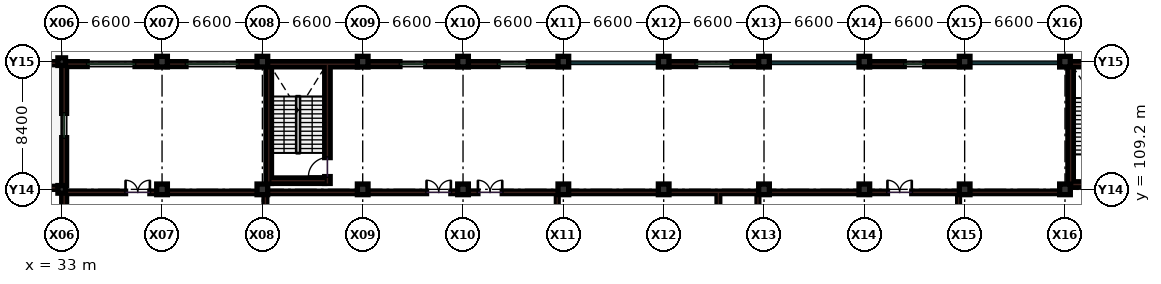
"""IFC4 building model, lengths in metres.
Left out: names, types, materials, properties, quantities, classifications, styles, units other than length and angle.
Written with IfcOpenShell. Run it as: python <this file> out.ifc"""

import sys

from ifc_helpers import new_model, si_unit, direction, frame, frame_2d, origin, origin_2d, place, context, subcontext, project, spatial, rectangle, extrude, element, fill, save


model = new_model("IFC4")
c1 = context("Model", 3, precision=1e-05, world=origin(), true_north=direction((0.0, 1.0)))
c2 = subcontext(c1, "Body", "Model", "MODEL_VIEW")
j1 = project(units=[si_unit("LENGTHUNIT", "METRE"), si_unit("PLANEANGLEUNIT", "RADIAN")], contexts=[c1])
p1 = place(None, origin())
s1 = spatial("IfcSite", under=j1, at=p1, CompositionType="ELEMENT")
p2 = place(p1, origin())
s2 = spatial("IfcBuilding", under=s1, at=p2, CompositionType="ELEMENT")
p3 = place(p2, frame((0.0, 0.0, 5.4)))
s3 = spatial("IfcBuildingStorey", under=s2, at=p3, CompositionType="ELEMENT", Elevation=5.4)
for number, where, z_axis, x_axis in (
    (1, (33.0, 109.2, 0.0), (0.0, 0.0, 1.0), (1.0, 0.0, 0.0)),
    (2, (33.0, 117.6, 0.0), (0.0, 0.0, 1.0), (1.0, 0.0, 0.0)),
):
    element("IfcColumn", number, at=place(p3, frame(where, z_axis=z_axis, x_axis=x_axis)), inside=s3, PredefinedType="COLUMN", context=c2, shape_type="SweptSolid", body=[
        extrude(rectangle(XDim=0.5, YDim=0.5, at=origin_2d()), origin(), (0.0, 0.0, 1.0), 4.5),
    ])
for number, where, z_axis, x_axis in (
    (3, (39.6, 109.2, 0.0), (0.0, 0.0, 1.0), (1.0, 0.0, 0.0)),
    (4, (39.6, 117.6, 0.0), (0.0, 0.0, 1.0), (1.0, 0.0, 0.0)),
    (5, (46.2, 109.2, 0.0), (0.0, 0.0, 1.0), (1.0, 0.0, 0.0)),
    (6, (46.2, 117.6, 0.0), (0.0, 0.0, 1.0), (1.0, 0.0, 0.0)),
    (7, (52.8, 109.2, 0.0), (0.0, 0.0, 1.0), (1.0, 0.0, 0.0)),
    (8, (52.8, 117.6, 0.0), (0.0, 0.0, 1.0), (1.0, 0.0, 0.0)),
    (9, (59.4, 109.2, 0.0), (0.0, 0.0, 1.0), (1.0, 0.0, 0.0)),
    (10, (59.4, 117.6, 0.0), (0.0, 0.0, 1.0), (1.0, 0.0, 0.0)),
    (11, (66.0, 109.2, 0.0), (0.0, 0.0, 1.0), (1.0, 0.0, 0.0)),
    (12, (66.0, 117.6, 0.0), (0.0, 0.0, 1.0), (1.0, 0.0, 0.0)),
    (13, (72.6, 109.2, 0.0), (0.0, 0.0, 1.0), (1.0, 0.0, 0.0)),
    (14, (72.6, 117.6, 0.0), (0.0, 0.0, 1.0), (1.0, 0.0, 0.0)),
    (15, (79.2, 109.2, 0.0), (0.0, 0.0, 1.0), (1.0, 0.0, 0.0)),
    (16, (79.2, 117.6, 0.0), (0.0, 0.0, 1.0), (1.0, 0.0, 0.0)),
    (17, (85.8, 109.2, 0.0), (0.0, 0.0, 1.0), (1.0, 0.0, 0.0)),
    (18, (85.8, 117.6, 0.0), (0.0, 0.0, 1.0), (1.0, 0.0, 0.0)),
    (19, (92.4, 109.2, 0.0), (0.0, 0.0, 1.0), (1.0, 0.0, 0.0)),
    (20, (92.4, 117.6, 0.0), (0.0, 0.0, 1.0), (1.0, 0.0, 0.0)),
    (21, (99.0, 109.2, 0.0), (0.0, 0.0, 1.0), (1.0, 0.0, 0.0)),
    (22, (99.0, 117.6, 0.0), (0.0, 0.0, 1.0), (1.0, 0.0, 0.0)),
):
    element("IfcColumn", number, at=place(p3, frame(where, z_axis=z_axis, x_axis=x_axis)), inside=s3, PredefinedType="COLUMN", context=c2, shape_type="SweptSolid", body=[
        extrude(rectangle(XDim=0.7, YDim=0.7, at=origin_2d()), origin(), (0.0, 0.0, 1.0), 4.5),
    ])
p4 = place(p3, frame((33.32, 109.0, 0.0), z_axis=(0.0, 0.0, 1.0), x_axis=(1.0, 0.0, 0.0)))
e23 = element("IfcWall", 23, at=p4, inside=s3, PredefinedType="PARTITIONING", context=c2, shape_type="SweptSolid", body=[
    extrude(rectangle(XDim=5.83, YDim=0.16, at=frame_2d((2.915, 0.0))), origin(), (0.0, 0.0, 1.0), 3.435),
])
p5 = place(p4, frame((3.88, 0.0, 0.0)))
e24 = element("IfcOpeningElement", 24, at=p5, cuts=e23, PredefinedType="OPENING", context=c2, shape_type="SweptSolid", body=[
    extrude(rectangle(XDim=1.6, YDim=2.2, at=frame_2d((0.8, 1.1))), frame((0.0, 0.09, 0.0), z_axis=(0.0, -1.0, 0.0), x_axis=(1.0, 0.0, 0.0)), (0.0, 0.0, 1.0), 0.18),
])
p6 = place(p3, frame((40.05, 109.0, 0.0), z_axis=(0.0, 0.0, 1.0), x_axis=(1.0, 0.0, 0.0)))
e25 = element("IfcWall", 25, at=p6, inside=s3, PredefinedType="PARTITIONING", context=c2, shape_type="SweptSolid", body=[
    extrude(rectangle(XDim=5.7, YDim=0.16, at=frame_2d((2.85, 0.0))), origin(), (0.0, 0.0, 1.0), 3.435),
])
p7 = place(p3, frame((46.65, 109.0, 0.0), z_axis=(0.0, 0.0, 1.0), x_axis=(1.0, 0.0, 0.0)))
e26 = element("IfcWall", 26, at=p7, inside=s3, PredefinedType="PARTITIONING", context=c2, shape_type="SweptSolid", body=[
    extrude(rectangle(XDim=5.7, YDim=0.16, at=frame_2d((2.85, 0.0))), origin(), (0.0, 0.0, 1.0), 3.435),
])
p8 = place(p3, frame((53.25, 109.0, 0.0), z_axis=(0.0, 0.0, 1.0), x_axis=(1.0, 0.0, 0.0)))
e27 = element("IfcWall", 27, at=p8, inside=s3, PredefinedType="PARTITIONING", context=c2, shape_type="SweptSolid", body=[
    extrude(rectangle(XDim=5.7, YDim=0.16, at=frame_2d((2.85, 0.0))), origin(), (0.0, 0.0, 1.0), 3.435),
])
p9 = place(p8, frame((3.75, 0.0, 0.0)))
e28 = element("IfcOpeningElement", 28, at=p9, cuts=e27, PredefinedType="OPENING", context=c2, shape_type="SweptSolid", body=[
    extrude(rectangle(XDim=1.6, YDim=2.2, at=frame_2d((0.8, 1.1))), frame((0.0, 0.09, 0.0), z_axis=(0.0, -1.0, 0.0), x_axis=(1.0, 0.0, 0.0)), (0.0, 0.0, 1.0), 0.18),
])
p10 = place(p3, frame((59.85, 109.0, 0.0), z_axis=(0.0, 0.0, 1.0), x_axis=(1.0, 0.0, 0.0)))
e29 = element("IfcWall", 29, at=p10, inside=s3, PredefinedType="PARTITIONING", context=c2, shape_type="SweptSolid", body=[
    extrude(rectangle(XDim=5.7, YDim=0.16, at=frame_2d((2.85, 0.0))), origin(), (0.0, 0.0, 1.0), 3.435),
])
p11 = place(p10, frame((0.53, 0.0, 0.0)))
e30 = element("IfcOpeningElement", 30, at=p11, cuts=e29, PredefinedType="OPENING", context=c2, shape_type="SweptSolid", body=[
    extrude(rectangle(XDim=1.6, YDim=2.2, at=frame_2d((0.8, 1.1))), frame((0.0, 0.09, 0.0), z_axis=(0.0, -1.0, 0.0), x_axis=(1.0, 0.0, 0.0)), (0.0, 0.0, 1.0), 0.18),
])
for number, where, z_axis, x_axis in (
    (31, (66.45, 109.0, 0.0), (0.0, 0.0, 1.0), (1.0, 0.0, 0.0)),
    (32, (73.05, 109.0, 0.0), (0.0, 0.0, 1.0), (1.0, 0.0, 0.0)),
):
    element("IfcWall", number, at=place(p3, frame(where, z_axis=z_axis, x_axis=x_axis)), inside=s3, PredefinedType="PARTITIONING", context=c2, shape_type="SweptSolid", body=[
        extrude(rectangle(XDim=5.7, YDim=0.16, at=frame_2d((2.85, 0.0))), origin(), (0.0, 0.0, 1.0), 3.435),
    ])
p12 = place(p3, frame((79.65, 109.0, 0.0), z_axis=(0.0, 0.0, 1.0), x_axis=(1.0, 0.0, 0.0)))
e33 = element("IfcWall", 33, at=p12, inside=s3, PredefinedType="PARTITIONING", context=c2, shape_type="SweptSolid", body=[
    extrude(rectangle(XDim=5.7, YDim=0.16, at=frame_2d((2.85, 0.0))), origin(), (0.0, 0.0, 1.0), 3.435),
])
p13 = place(p3, frame((86.25, 109.0, 0.0), z_axis=(0.0, 0.0, 1.0), x_axis=(1.0, 0.0, 0.0)))
e34 = element("IfcWall", 34, at=p13, inside=s3, PredefinedType="PARTITIONING", context=c2, shape_type="SweptSolid", body=[
    extrude(rectangle(XDim=5.7, YDim=0.16, at=frame_2d((2.85, 0.0))), origin(), (0.0, 0.0, 1.0), 3.435),
])
p14 = place(p13, frame((1.07, 0.0, 0.0)))
e35 = element("IfcOpeningElement", 35, at=p14, cuts=e34, PredefinedType="OPENING", context=c2, shape_type="SweptSolid", body=[
    extrude(rectangle(XDim=1.6, YDim=2.2, at=frame_2d((0.8, 1.1))), frame((0.0, 0.09, 0.0), z_axis=(0.0, -1.0, 0.0), x_axis=(1.0, 0.0, 0.0)), (0.0, 0.0, 1.0), 0.18),
])
p15 = place(p3, frame((92.85, 109.0, 0.0), z_axis=(0.0, 0.0, 1.0), x_axis=(1.0, 0.0, 0.0)))
e36 = element("IfcWall", 36, at=p15, inside=s3, PredefinedType="PARTITIONING", context=c2, shape_type="SweptSolid", body=[
    extrude(rectangle(XDim=6.45, YDim=0.16, at=frame_2d((3.225, 0.0))), origin(), (0.0, 0.0, 1.0), 3.435),
])
for number, where, z_axis, x_axis in (
    (37, (46.4, 100.8, 0.0), (0.0, 0.0, 1.0), (0.0, 1.0, 0.0)),
    (38, (76.2, 100.8, 0.0), (0.0, 0.0, 1.0), (0.0, 1.0, 0.0)),
):
    element("IfcWall", number, at=place(p3, frame(where, z_axis=z_axis, x_axis=x_axis)), inside=s3, PredefinedType="SOLIDWALL", context=c2, shape_type="SweptSolid", body=[
        extrude(rectangle(XDim=8.2, YDim=0.18, at=frame_2d((4.1, 0.0))), origin(), (0.0, 0.0, 1.0), 3.45),
    ])
p16 = place(p3, frame((65.6, 101.0, 0.0), z_axis=(0.0, 0.0, 1.0), x_axis=(0.0, 1.0, 0.0)))
e39 = element("IfcWall", 39, at=p16, inside=s3, PredefinedType="PARTITIONING", context=c2, shape_type="SweptSolid", body=[
    extrude(rectangle(XDim=8.0, YDim=0.12, at=frame_2d((4.0, 0.0))), origin(), (0.0, 0.0, 1.0), 3.45),
])
p17 = place(p16, frame((3.8, 0.0, 0.0)))
e40 = element("IfcOpeningElement", 40, at=p17, cuts=e39, PredefinedType="OPENING", context=c2, shape_type="SweptSolid", body=[
    extrude(rectangle(XDim=1.15, YDim=2.2, at=frame_2d((0.575, 1.1))), frame((0.0, 0.07, 0.0), z_axis=(0.0, -1.0, 0.0), x_axis=(1.0, 0.0, 0.0)), (0.0, 0.0, 1.0), 0.14),
])
p18 = place(p3, frame((78.8, 101.0, 0.0), z_axis=(0.0, 0.0, 1.0), x_axis=(0.0, 1.0, 0.0)))
e41 = element("IfcWall", 41, at=p18, inside=s3, PredefinedType="PARTITIONING", context=c2, shape_type="SweptSolid", body=[
    extrude(rectangle(XDim=8.0, YDim=0.12, at=frame_2d((4.0, 0.0))), origin(), (0.0, 0.0, 1.0), 3.45),
])
p19 = place(p18, frame((3.8, 0.0, 0.0)))
e42 = element("IfcOpeningElement", 42, at=p19, cuts=e41, PredefinedType="OPENING", context=c2, shape_type="SweptSolid", body=[
    extrude(rectangle(XDim=1.45, YDim=2.25, at=frame_2d((0.725, 1.125))), frame((0.0, 0.07, 0.0), z_axis=(0.0, -1.0, 0.0), x_axis=(1.0, 0.0, 0.0)), (0.0, 0.0, 1.0), 0.14),
])
p20 = place(p3, frame((92.0, 101.0, 0.0), z_axis=(0.0, 0.0, 1.0), x_axis=(0.0, 1.0, 0.0)))
e43 = element("IfcWall", 43, at=p20, inside=s3, PredefinedType="PARTITIONING", context=c2, shape_type="SweptSolid", body=[
    extrude(rectangle(XDim=8.0, YDim=0.12, at=frame_2d((4.0, 0.0))), origin(), (0.0, 0.0, 1.0), 3.45),
])
p21 = place(p20, frame((3.8, 0.0, 0.0)))
e44 = element("IfcOpeningElement", 44, at=p21, cuts=e43, PredefinedType="OPENING", context=c2, shape_type="SweptSolid", body=[
    extrude(rectangle(XDim=1.75, YDim=2.3, at=frame_2d((0.875, 1.15))), frame((0.0, 0.07, 0.0), z_axis=(0.0, -1.0, 0.0), x_axis=(1.0, 0.0, 0.0)), (0.0, 0.0, 1.0), 0.14),
])
p22 = place(p3, frame((33.16, 108.955, 0.0), z_axis=(0.0, 0.0, 1.0), x_axis=(0.0, -1.0, 0.0)))
e45 = element("IfcWall", 45, at=p22, inside=s3, PredefinedType="SOLIDWALL", context=c2, shape_type="SweptSolid", body=[
    extrude(rectangle(XDim=7.91, YDim=0.32, at=frame_2d((3.955, 0.0))), origin(), (0.0, 0.0, 1.0), 3.485),
])
p23 = place(p22, frame((3.305, 0.0, 0.95)))
e46 = element("IfcOpeningElement", 46, at=p23, cuts=e45, PredefinedType="OPENING", context=c2, shape_type="SweptSolid", body=[
    extrude(rectangle(XDim=1.3, YDim=1.75, at=frame_2d((0.65, 0.875))), frame((0.0, 0.17, 0.0), z_axis=(0.0, -1.0, 0.0), x_axis=(1.0, 0.0, 0.0)), (0.0, 0.0, 1.0), 0.34),
])
p24 = place(p3, frame((39.255, 117.44, 0.0), z_axis=(0.0, 0.0, 1.0), x_axis=(-1.0, 0.0, 0.0)))
e47 = element("IfcWall", 47, at=p24, inside=s3, PredefinedType="SOLIDWALL", context=c2, shape_type="SweptSolid", body=[
    extrude(rectangle(XDim=6.01, YDim=0.32, at=frame_2d((3.005, 0.0))), origin(), (0.0, 0.0, 1.0), 3.585),
])
p25 = place(p24, frame((1.43, 0.0, 0.95)))
e48 = element("IfcOpeningElement", 48, at=p25, cuts=e47, PredefinedType="OPENING", context=c2, shape_type="SweptSolid", body=[
    extrude(rectangle(XDim=3.15, YDim=1.7, at=frame_2d((1.575, 0.85))), frame((0.0, 0.17, 0.0), z_axis=(0.0, -1.0, 0.0), x_axis=(1.0, 0.0, 0.0)), (0.0, 0.0, 1.0), 0.34),
])
p26 = place(p3, frame((33.16, 117.355, 0.0), z_axis=(0.0, 0.0, 1.0), x_axis=(0.0, -1.0, 0.0)))
e49 = element("IfcWall", 49, at=p26, inside=s3, PredefinedType="SOLIDWALL", context=c2, shape_type="SweptSolid", body=[
    extrude(rectangle(XDim=7.91, YDim=0.32, at=frame_2d((3.955, 0.0))), origin(), (0.0, 0.0, 1.0), 3.635),
])
p27 = place(p26, frame((3.155, 0.0, 0.95)))
e50 = element("IfcOpeningElement", 50, at=p27, cuts=e49, PredefinedType="OPENING", context=c2, shape_type="SweptSolid", body=[
    extrude(rectangle(XDim=1.6, YDim=1.85, at=frame_2d((0.8, 0.925))), frame((0.0, 0.17, 0.0), z_axis=(0.0, -1.0, 0.0), x_axis=(1.0, 0.0, 0.0)), (0.0, 0.0, 1.0), 0.34),
])
p28 = place(p3, frame((45.855, 117.44, 0.0), z_axis=(0.0, 0.0, 1.0), x_axis=(-1.0, 0.0, 0.0)))
e51 = element("IfcWall", 51, at=p28, inside=s3, PredefinedType="SOLIDWALL", context=c2, shape_type="SweptSolid", body=[
    extrude(rectangle(XDim=5.91, YDim=0.32, at=frame_2d((2.955, 0.0))), origin(), (0.0, 0.0, 1.0), 3.585),
])
p29 = place(p28, frame((1.23, 0.0, 0.95)))
e52 = element("IfcOpeningElement", 52, at=p29, cuts=e51, PredefinedType="OPENING", context=c2, shape_type="SweptSolid", body=[
    extrude(rectangle(XDim=3.45, YDim=1.7, at=frame_2d((1.725, 0.85))), frame((0.0, 0.17, 0.0), z_axis=(0.0, -1.0, 0.0), x_axis=(1.0, 0.0, 0.0)), (0.0, 0.0, 1.0), 0.34),
])
p30 = place(p3, frame((52.455, 117.43, 0.0), z_axis=(0.0, 0.0, 1.0), x_axis=(-1.0, 0.0, 0.0)))
e53 = element("IfcWall", 53, at=p30, inside=s3, PredefinedType="SHEAR", context=c2, shape_type="SweptSolid", body=[
    extrude(rectangle(XDim=5.91, YDim=0.34, at=frame_2d((2.955, 0.0))), origin(), (0.0, 0.0, 1.0), 4.2),
])
p31 = place(p3, frame((59.055, 117.44, 0.0), z_axis=(0.0, 0.0, 1.0), x_axis=(-1.0, 0.0, 0.0)))
e54 = element("IfcWall", 54, at=p31, inside=s3, PredefinedType="SOLIDWALL", context=c2, shape_type="SweptSolid", body=[
    extrude(rectangle(XDim=5.91, YDim=0.32, at=frame_2d((2.955, 0.0))), origin(), (0.0, 0.0, 1.0), 3.585),
])
p32 = place(p31, frame((2.105, 0.0, 0.95)))
e55 = element("IfcOpeningElement", 55, at=p32, cuts=e54, PredefinedType="OPENING", context=c2, shape_type="SweptSolid", body=[
    extrude(rectangle(XDim=1.7, YDim=1.95, at=frame_2d((0.85, 0.975))), frame((0.0, 0.17, 0.0), z_axis=(0.0, -1.0, 0.0), x_axis=(1.0, 0.0, 0.0)), (0.0, 0.0, 1.0), 0.34),
])
p33 = place(p3, frame((65.655, 117.44, 0.0), z_axis=(0.0, 0.0, 1.0), x_axis=(-1.0, 0.0, 0.0)))
e56 = element("IfcWall", 56, at=p33, inside=s3, PredefinedType="SOLIDWALL", context=c2, shape_type="SweptSolid", body=[
    extrude(rectangle(XDim=5.91, YDim=0.32, at=frame_2d((2.955, 0.0))), origin(), (0.0, 0.0, 1.0), 3.585),
])
p34 = place(p33, frame((1.955, 0.0, 0.95)))
e57 = element("IfcOpeningElement", 57, at=p34, cuts=e56, PredefinedType="OPENING", context=c2, shape_type="SweptSolid", body=[
    extrude(rectangle(XDim=2.0, YDim=1.95, at=frame_2d((1.0, 0.975))), frame((0.0, 0.17, 0.0), z_axis=(0.0, -1.0, 0.0), x_axis=(1.0, 0.0, 0.0)), (0.0, 0.0, 1.0), 0.34),
])
p35 = place(p3, frame((78.855, 117.44, 0.0), z_axis=(0.0, 0.0, 1.0), x_axis=(-1.0, 0.0, 0.0)))
e58 = element("IfcWall", 58, at=p35, inside=s3, PredefinedType="SOLIDWALL", context=c2, shape_type="SweptSolid", body=[
    extrude(rectangle(XDim=5.91, YDim=0.32, at=frame_2d((2.955, 0.0))), origin(), (0.0, 0.0, 1.0), 3.585),
])
p36 = place(p35, frame((1.755, 0.0, 0.95)))
e59 = element("IfcOpeningElement", 59, at=p36, cuts=e58, PredefinedType="OPENING", context=c2, shape_type="SweptSolid", body=[
    extrude(rectangle(XDim=2.4, YDim=1.6, at=frame_2d((1.2, 0.8))), frame((0.0, 0.17, 0.0), z_axis=(0.0, -1.0, 0.0), x_axis=(1.0, 0.0, 0.0)), (0.0, 0.0, 1.0), 0.34),
])
p37 = place(p3, frame((92.055, 117.44, 0.0), z_axis=(0.0, 0.0, 1.0), x_axis=(-1.0, 0.0, 0.0)))
e60 = element("IfcWall", 60, at=p37, inside=s3, PredefinedType="SOLIDWALL", context=c2, shape_type="SweptSolid", body=[
    extrude(rectangle(XDim=5.91, YDim=0.32, at=frame_2d((2.955, 0.0))), origin(), (0.0, 0.0, 1.0), 3.585),
])
p38 = place(p37, frame((2.28, 0.0, 0.95)))
e61 = element("IfcOpeningElement", 61, at=p38, cuts=e60, PredefinedType="OPENING", context=c2, shape_type="SweptSolid", body=[
    extrude(rectangle(XDim=1.35, YDim=1.55, at=frame_2d((0.675, 0.775))), frame((0.0, 0.17, 0.0), z_axis=(0.0, -1.0, 0.0), x_axis=(1.0, 0.0, 0.0)), (0.0, 0.0, 1.0), 0.34),
])
p39 = place(p3, frame((105.255, 117.43, 0.0), z_axis=(0.0, 0.0, 1.0), x_axis=(-1.0, 0.0, 0.0)))
e62 = element("IfcWall", 62, at=p39, inside=s3, PredefinedType="SHEAR", context=c2, shape_type="SweptSolid", body=[
    extrude(rectangle(XDim=5.91, YDim=0.34, at=frame_2d((2.955, 0.0))), origin(), (0.0, 0.0, 1.0), 4.2),
])
for number, where, z_axis, x_axis in (
    (63, (6.8, 109.3, 0.0), (0.0, 0.0, 1.0), (1.0, 0.0, 0.0)),
    (64, (32.6, 117.5, 0.0), (0.0, 0.0, 1.0), (-1.0, 0.0, 0.0)),
):
    element("IfcWall", number, at=place(p3, frame(where, z_axis=z_axis, x_axis=x_axis)), inside=s3, PredefinedType="PARAPET", context=c2, shape_type="SweptSolid", body=[
        extrude(rectangle(XDim=25.8, YDim=0.2, at=frame_2d((12.9, 0.0))), origin(), (0.0, 0.0, 1.0), 1.1),
    ])
p40 = place(p3, frame((99.37, 109.34, 0.0), z_axis=(0.0, 0.0, 1.0), x_axis=(0.0, 1.0, 0.0)))
e65 = element("IfcWall", 65, at=p40, inside=s3, PredefinedType="SHEAR", context=c2, shape_type="SweptSolid", body=[
    extrude(rectangle(XDim=8.09, YDim=0.36, at=frame_2d((4.045, 0.0))), origin(), (0.0, 0.0, 1.0), 4.2),
])
p41 = place(p3, frame((99.55, 109.52, 0.0), z_axis=(0.0, 0.0, 1.0), x_axis=(1.0, 0.0, 0.0)))
e66 = element("IfcWall", 66, at=p41, inside=s3, PredefinedType="SHEAR", context=c2, shape_type="SweptSolid", body=[
    extrude(rectangle(XDim=3.8, YDim=0.36, at=frame_2d((1.9, 0.0))), origin(), (0.0, 0.0, 1.0), 4.2),
])
p42 = place(p3, frame((46.62, 109.59, 0.0), z_axis=(0.0, 0.0, 1.0), x_axis=(0.0, 1.0, 0.0)))
e67 = element("IfcWall", 67, at=p42, inside=s3, PredefinedType="SHEAR", context=c2, shape_type="SweptSolid", body=[
    extrude(rectangle(XDim=7.84, YDim=0.36, at=frame_2d((3.92, 0.0))), origin(), (0.0, 0.0, 1.0), 4.2),
])
p43 = place(p3, frame((50.48, 109.59, 0.0), z_axis=(0.0, 0.0, 1.0), x_axis=(0.0, 1.0, 0.0)))
e68 = element("IfcWall", 68, at=p43, inside=s3, PredefinedType="SHEAR", context=c2, shape_type="SweptSolid", body=[
    extrude(rectangle(XDim=7.84, YDim=0.36, at=frame_2d((3.92, 0.0))), origin(), (0.0, 0.0, 1.0), 4.2),
])
p44 = place(p43, frame((0.45, 0.0, 0.0)))
e69 = element("IfcOpeningElement", 69, at=p44, cuts=e68, PredefinedType="OPENING", context=c2, shape_type="SweptSolid", body=[
    extrude(rectangle(XDim=1.25, YDim=2.15, at=frame_2d((0.625, 1.075))), frame((0.0, 0.19, 0.0), z_axis=(0.0, -1.0, 0.0), x_axis=(1.0, 0.0, 0.0)), (0.0, 0.0, 1.0), 0.38),
])
p45 = place(p3, frame((46.8, 109.77, 0.0), z_axis=(0.0, 0.0, 1.0), x_axis=(1.0, 0.0, 0.0)))
e70 = element("IfcWall", 70, at=p45, inside=s3, PredefinedType="SHEAR", context=c2, shape_type="SweptSolid", body=[
    extrude(rectangle(XDim=3.5, YDim=0.36, at=frame_2d((1.75, 0.0))), origin(), (0.0, 0.0, 1.0), 4.2),
])
p46 = place(p5, origin())
e71 = element("IfcDoor", 71, at=p46, inside=s3, OperationType="DOUBLE_DOOR_SINGLE_SWING", PredefinedType="DOOR", context=c2, shape_type="SweptSolid", body=[
    extrude(rectangle(XDim=1.6, YDim=2.2, at=frame_2d((0.8, 1.1))), frame((0.0, 0.025, 0.0), z_axis=(0.0, -1.0, 0.0), x_axis=(1.0, 0.0, 0.0)), (0.0, 0.0, 1.0), 0.05),
])
fill(e24, e71)
p47 = place(p9, origin())
e72 = element("IfcDoor", 72, at=p47, inside=s3, OperationType="DOUBLE_DOOR_SINGLE_SWING", PredefinedType="DOOR", context=c2, shape_type="SweptSolid", body=[
    extrude(rectangle(XDim=1.6, YDim=2.2, at=frame_2d((0.8, 1.1))), frame((0.0, 0.025, 0.0), z_axis=(0.0, -1.0, 0.0), x_axis=(1.0, 0.0, 0.0)), (0.0, 0.0, 1.0), 0.05),
])
fill(e28, e72)
p48 = place(p11, origin())
e73 = element("IfcDoor", 73, at=p48, inside=s3, OperationType="DOUBLE_DOOR_SINGLE_SWING", PredefinedType="DOOR", context=c2, shape_type="SweptSolid", body=[
    extrude(rectangle(XDim=1.6, YDim=2.2, at=frame_2d((0.8, 1.1))), frame((0.0, 0.025, 0.0), z_axis=(0.0, -1.0, 0.0), x_axis=(1.0, 0.0, 0.0)), (0.0, 0.0, 1.0), 0.05),
])
fill(e30, e73)
p49 = place(p14, origin())
e74 = element("IfcDoor", 74, at=p49, inside=s3, OperationType="DOUBLE_DOOR_SINGLE_SWING", PredefinedType="DOOR", context=c2, shape_type="SweptSolid", body=[
    extrude(rectangle(XDim=1.6, YDim=2.2, at=frame_2d((0.8, 1.1))), frame((0.0, 0.025, 0.0), z_axis=(0.0, -1.0, 0.0), x_axis=(1.0, 0.0, 0.0)), (0.0, 0.0, 1.0), 0.05),
])
fill(e35, e74)
p50 = place(p25, origin())
e75 = element("IfcWindow", 75, at=p50, inside=s3, PartitioningType="SINGLE_PANEL", PredefinedType="WINDOW", context=c2, shape_type="SweptSolid", body=[
    extrude(rectangle(XDim=3.15, YDim=1.7, at=frame_2d((1.575, 0.85))), frame((0.0, 0.03, 0.0), z_axis=(0.0, -1.0, 0.0), x_axis=(1.0, 0.0, 0.0)), (0.0, 0.0, 1.0), 0.06),
])
fill(e48, e75)
p51 = place(p27, origin())
e76 = element("IfcWindow", 76, at=p51, inside=s3, PartitioningType="SINGLE_PANEL", PredefinedType="WINDOW", context=c2, shape_type="SweptSolid", body=[
    extrude(rectangle(XDim=1.6, YDim=1.85, at=frame_2d((0.8, 0.925))), frame((0.0, 0.03, 0.0), z_axis=(0.0, -1.0, 0.0), x_axis=(1.0, 0.0, 0.0)), (0.0, 0.0, 1.0), 0.06),
])
fill(e50, e76)
p52 = place(p29, origin())
e77 = element("IfcWindow", 77, at=p52, inside=s3, PartitioningType="SINGLE_PANEL", PredefinedType="WINDOW", context=c2, shape_type="SweptSolid", body=[
    extrude(rectangle(XDim=3.45, YDim=1.7, at=frame_2d((1.725, 0.85))), frame((0.0, 0.03, 0.0), z_axis=(0.0, -1.0, 0.0), x_axis=(1.0, 0.0, 0.0)), (0.0, 0.0, 1.0), 0.06),
])
fill(e52, e77)
p53 = place(p32, origin())
e78 = element("IfcWindow", 78, at=p53, inside=s3, PartitioningType="SINGLE_PANEL", PredefinedType="WINDOW", context=c2, shape_type="SweptSolid", body=[
    extrude(rectangle(XDim=1.7, YDim=1.95, at=frame_2d((0.85, 0.975))), frame((0.0, 0.03, 0.0), z_axis=(0.0, -1.0, 0.0), x_axis=(1.0, 0.0, 0.0)), (0.0, 0.0, 1.0), 0.06),
])
fill(e55, e78)
p54 = place(p34, origin())
e79 = element("IfcWindow", 79, at=p54, inside=s3, PartitioningType="SINGLE_PANEL", PredefinedType="WINDOW", context=c2, shape_type="SweptSolid", body=[
    extrude(rectangle(XDim=2.0, YDim=1.95, at=frame_2d((1.0, 0.975))), frame((0.0, 0.03, 0.0), z_axis=(0.0, -1.0, 0.0), x_axis=(1.0, 0.0, 0.0)), (0.0, 0.0, 1.0), 0.06),
])
fill(e57, e79)
p55 = place(p36, origin())
e80 = element("IfcWindow", 80, at=p55, inside=s3, PartitioningType="SINGLE_PANEL", PredefinedType="WINDOW", context=c2, shape_type="SweptSolid", body=[
    extrude(rectangle(XDim=2.4, YDim=1.6, at=frame_2d((1.2, 0.8))), frame((0.0, 0.03, 0.0), z_axis=(0.0, -1.0, 0.0), x_axis=(1.0, 0.0, 0.0)), (0.0, 0.0, 1.0), 0.06),
])
fill(e59, e80)
p56 = place(p38, origin())
e81 = element("IfcWindow", 81, at=p56, inside=s3, PartitioningType="SINGLE_PANEL", PredefinedType="WINDOW", context=c2, shape_type="SweptSolid", body=[
    extrude(rectangle(XDim=1.35, YDim=1.55, at=frame_2d((0.675, 0.775))), frame((0.0, 0.03, 0.0), z_axis=(0.0, -1.0, 0.0), x_axis=(1.0, 0.0, 0.0)), (0.0, 0.0, 1.0), 0.06),
])
fill(e61, e81)
p57 = place(p44, origin())
e82 = element("IfcDoor", 82, at=p57, inside=s3, OperationType="SINGLE_SWING_LEFT", PredefinedType="DOOR", context=c2, shape_type="SweptSolid", body=[
    extrude(rectangle(XDim=1.25, YDim=2.15, at=frame_2d((0.625, 1.075))), frame((0.0, 0.025, 0.0), z_axis=(0.0, -1.0, 0.0), x_axis=(1.0, 0.0, 0.0)), (0.0, 0.0, 1.0), 0.05),
])
fill(e69, e82)
save(model, sys.argv[1])
